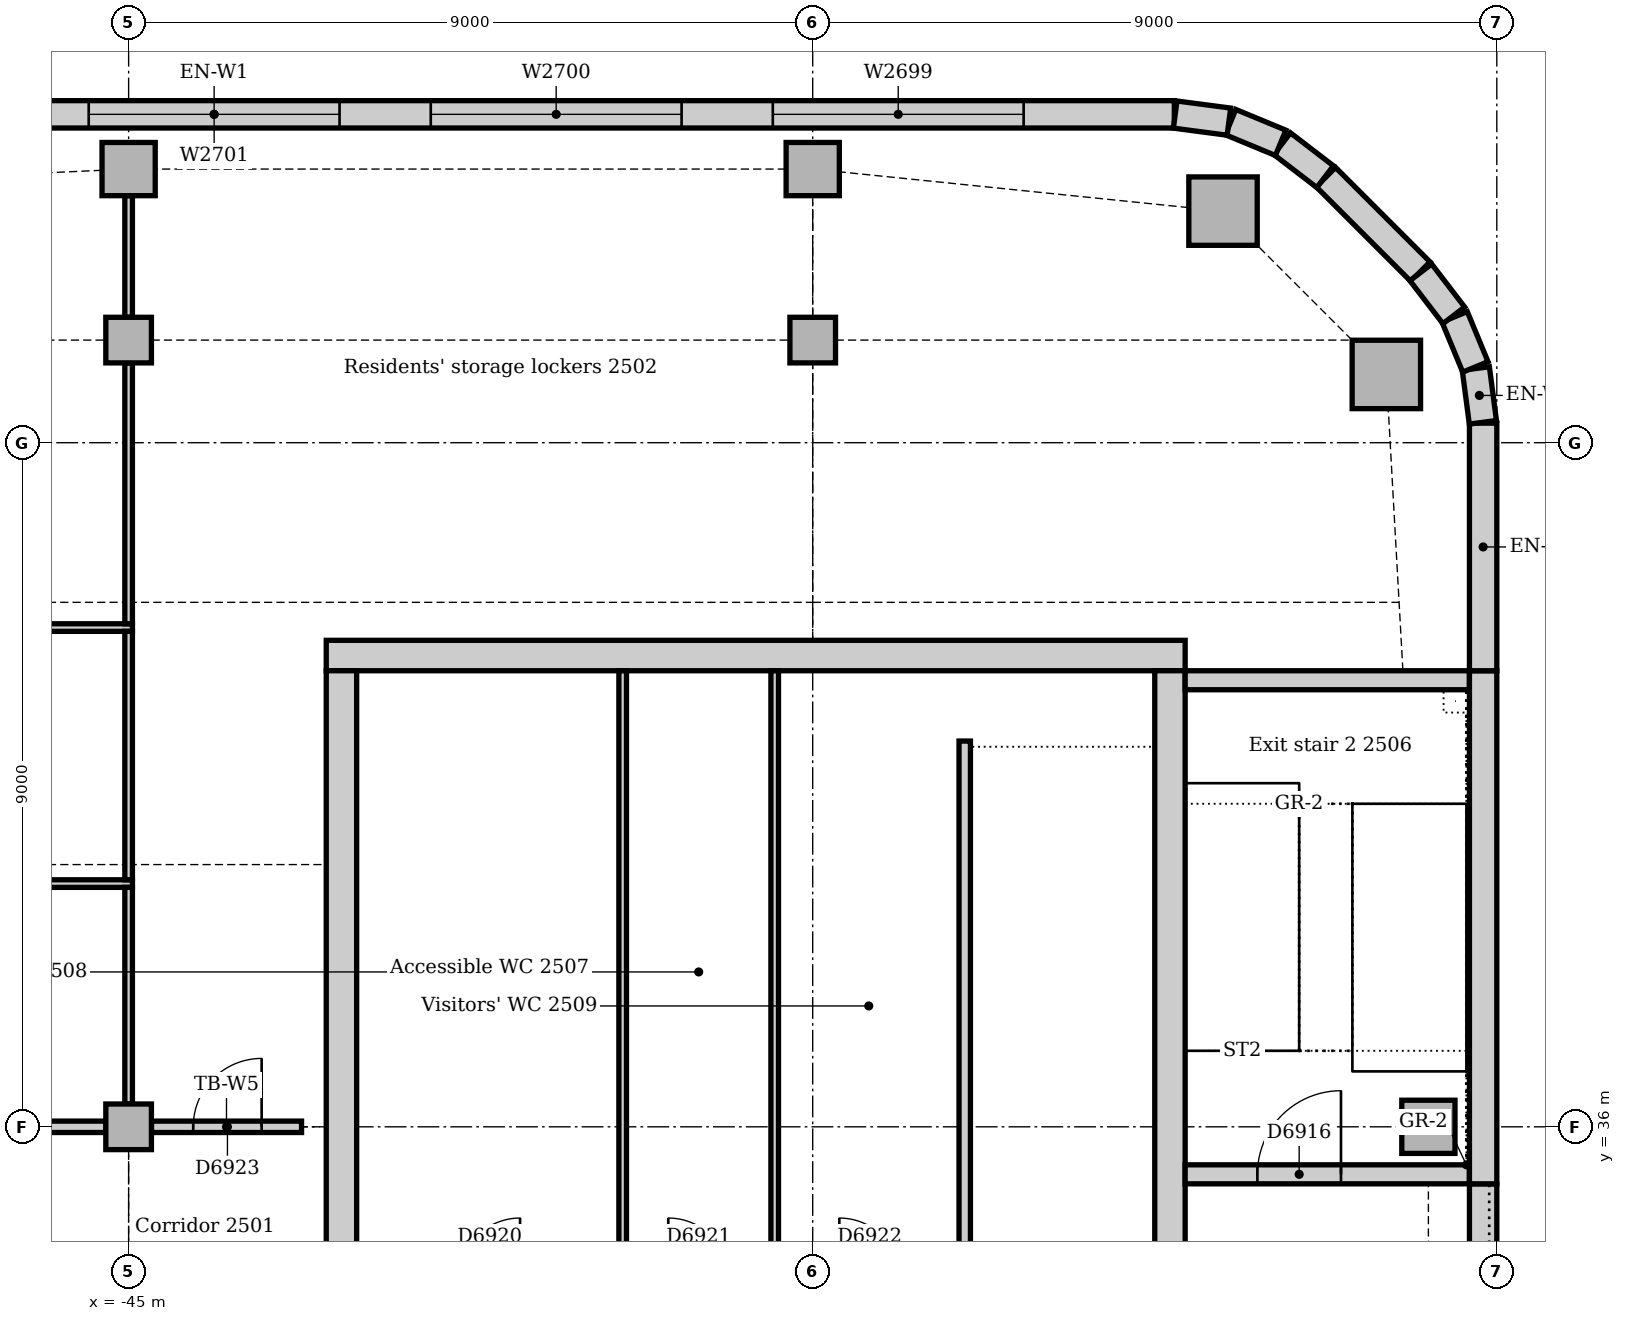
"""IFC4 building model, lengths in metres.
Left out: names, types, materials, properties, quantities, classifications, styles, units other than length and angle.
Written with IfcOpenShell. Run it as: python <this file> out.ifc"""

import sys

from ifc_helpers import new_model, si_unit, direction, frame, frame_2d, origin, origin_2d, place, context, subcontext, project, spatial, rectangle, extrude, element, fill, save


model = new_model("IFC4")
c1 = context("Model", 3, precision=1e-05, world=origin(), true_north=direction((0.0, 1.0)))
c2 = subcontext(c1, "Body", "Model", "MODEL_VIEW")
j1 = project(units=[si_unit("LENGTHUNIT", "METRE"), si_unit("PLANEANGLEUNIT", "RADIAN")], contexts=[c1])
p1 = place(None, origin())
s1 = spatial("IfcSite", under=j1, at=p1, CompositionType="ELEMENT")
p2 = place(p1, origin())
s2 = spatial("IfcBuilding", under=s1, at=p2, CompositionType="ELEMENT")
p3 = place(p2, frame((0.0, 0.0, 108.0)))
s3 = spatial("IfcBuildingStorey", under=s2, at=p3, CompositionType="ELEMENT", Elevation=108.0)
p4 = place(p3, frame((-31.1, 42.2, 0.0), z_axis=(0.0, 0.0, 1.0), x_axis=(-1.0, 0.0, 0.0)))
e1 = element("IfcWall", 1, at=p4, inside=s3, PredefinedType="SOLIDWALL", context=c2, shape_type="SweptSolid", body=[
    extrude(rectangle(XDim=11.3, YDim=0.4, at=frame_2d((5.65, 0.0))), origin(), (0.0, 0.0, 1.0), 4.0),
])
p5 = place(p3, frame((-31.3, 30.5, 0.0), z_axis=(0.0, 0.0, 1.0), x_axis=(0.0, 1.0, 0.0)))
e2 = element("IfcWall", 2, at=p5, inside=s3, PredefinedType="SOLIDWALL", context=c2, shape_type="SweptSolid", body=[
    extrude(rectangle(XDim=11.5, YDim=0.4, at=frame_2d((5.75, 0.0))), origin(), (0.0, 0.0, 1.0), 4.0),
])
p6 = place(p5, frame((0.85, 0.0, 0.0)))
e3 = element("IfcOpeningElement", 3, at=p6, cuts=e2, PredefinedType="OPENING", context=c2, shape_type="SweptSolid", body=[
    extrude(rectangle(XDim=1.8, YDim=2.1, at=frame_2d((0.9, 1.05))), frame((0.0, 0.21, 0.0), z_axis=(0.0, -1.0, 0.0), x_axis=(1.0, 0.0, 0.0)), (0.0, 0.0, 1.0), 0.42),
])
p7 = place(p3, frame((-42.2, 42.0, 0.0), z_axis=(0.0, 0.0, 1.0), x_axis=(0.0, -1.0, 0.0)))
e4 = element("IfcWall", 4, at=p7, inside=s3, PredefinedType="SOLIDWALL", context=c2, shape_type="SweptSolid", body=[
    extrude(rectangle(XDim=11.5, YDim=0.4, at=frame_2d((5.75, 0.0))), origin(), (0.0, 0.0, 1.0), 4.0),
])
p8 = place(p7, frame((8.85, 0.0, 0.0)))
e5 = element("IfcOpeningElement", 5, at=p8, cuts=e4, PredefinedType="OPENING", context=c2, shape_type="SweptSolid", body=[
    extrude(rectangle(XDim=1.8, YDim=2.1, at=frame_2d((0.9, 1.05))), frame((0.0, 0.21, 0.0), z_axis=(0.0, -1.0, 0.0), x_axis=(1.0, 0.0, 0.0)), (0.0, 0.0, 1.0), 0.42),
])
p9 = place(p3, frame((-31.1, 35.375, 0.0), z_axis=(0.0, 0.0, 1.0), x_axis=(1.0, 0.0, 0.0)))
e6 = element("IfcWall", 6, at=p9, inside=s3, PredefinedType="SOLIDWALL", context=c2, shape_type="SweptSolid", body=[
    extrude(rectangle(XDim=3.74, YDim=0.25, at=frame_2d((1.87, 0.0))), origin(), (0.0, 0.0, 1.0), 4.0),
])
p10 = place(p9, frame((0.95, 0.0, 0.0)))
e7 = element("IfcOpeningElement", 7, at=p10, cuts=e6, PredefinedType="OPENING", context=c2, shape_type="SweptSolid", body=[
    extrude(rectangle(XDim=1.1, YDim=2.1, at=frame_2d((0.55, 1.05))), frame((0.0, 0.135, 0.0), z_axis=(0.0, -1.0, 0.0), x_axis=(1.0, 0.0, 0.0)), (0.0, 0.0, 1.0), 0.27),
])
p11 = place(p3, frame((-27.36, 41.875, 0.0), z_axis=(0.0, 0.0, 1.0), x_axis=(-1.0, 0.0, 0.0)))
e8 = element("IfcWall", 8, at=p11, inside=s3, PredefinedType="SOLIDWALL", context=c2, shape_type="SweptSolid", body=[
    extrude(rectangle(XDim=3.74, YDim=0.25, at=frame_2d((1.87, 0.0))), origin(), (0.0, 0.0, 1.0), 4.0),
])
for number, where, z_axis, x_axis in (
    (9, (-28.453, 45.898, 0.0), (0.0, 0.0, 1.0), (1.0, 0.0, 0.0)),
    (10, (-30.602, 48.047, 0.0), (0.0, 0.0, 1.0), (1.0, 0.0, 0.0)),
):
    element("IfcColumn", number, at=place(p3, frame(where, z_axis=z_axis, x_axis=x_axis)), inside=s3, PredefinedType="COLUMN", context=c2, shape_type="SweptSolid", body=[
        extrude(rectangle(XDim=0.9, YDim=0.9, at=origin_2d()), origin(), (0.0, 0.0, 1.0), 3.85),
    ])
p12 = place(p3, frame((-27.9, 36.0, 0.0), z_axis=(0.0, 0.0, 1.0), x_axis=(1.0, 0.0, 0.0)))
e11 = element("IfcColumn", 11, at=p12, inside=s3, PredefinedType="COLUMN", context=c2, shape_type="SweptSolid", body=[
    extrude(rectangle(XDim=0.7, YDim=0.7, at=origin_2d()), origin(), (0.0, 0.0, 1.0), 4.0),
])
for number, where, z_axis, x_axis in (
    (12, (-45.0, 48.6, 0.0), (0.0, 0.0, 1.0), (1.0, 0.0, 0.0)),
    (13, (-36.0, 48.6, 0.0), (0.0, 0.0, 1.0), (1.0, 0.0, 0.0)),
):
    element("IfcColumn", number, at=place(p3, frame(where, z_axis=z_axis, x_axis=x_axis)), inside=s3, PredefinedType="COLUMN", context=c2, shape_type="SweptSolid", body=[
        extrude(rectangle(XDim=0.7, YDim=0.7, at=origin_2d()), origin(), (0.0, 0.0, 1.0), 3.85),
    ])
for number, where, z_axis, x_axis in (
    (14, (-45.0, 36.0, 0.0), (0.0, 0.0, 1.0), (1.0, 0.0, 0.0)),
    (15, (-45.0, 46.35, 0.0), (0.0, 0.0, 1.0), (1.0, 0.0, 0.0)),
    (16, (-36.0, 46.35, 0.0), (0.0, 0.0, 1.0), (1.0, 0.0, 0.0)),
):
    element("IfcColumn", number, at=place(p3, frame(where, z_axis=z_axis, x_axis=x_axis)), inside=s3, PredefinedType="COLUMN", context=c2, shape_type="SweptSolid", body=[
        extrude(rectangle(XDim=0.6, YDim=0.6, at=origin_2d()), origin(), (0.0, 0.0, 1.0), 3.85),
    ])
p13 = place(p3, frame((-27.18, 27.75, 0.0), z_axis=(0.0, 0.0, 1.0), x_axis=(0.0, 1.0, 0.0)))
e17 = element("IfcWall", 17, at=p13, inside=s3, PredefinedType="STANDARD", context=c2, shape_type="SweptSolid", body=[
    extrude(rectangle(XDim=7.5, YDim=0.36, at=frame_2d((3.75, 0.0))), origin(), (0.0, 0.0, 1.0), 3.85),
])
p14 = place(p13, frame((2.85, 0.0, 1.2)))
e18 = element("IfcOpeningElement", 18, at=p14, cuts=e17, PredefinedType="OPENING", context=c2, shape_type="SweptSolid", body=[
    extrude(rectangle(XDim=1.8, YDim=1.2, at=frame_2d((0.9, 0.6))), frame((0.0, 0.19, 0.0), z_axis=(0.0, -1.0, 0.0), x_axis=(1.0, 0.0, 0.0)), (0.0, 0.0, 1.0), 0.38),
])
p15 = place(p3, frame((-27.18, 35.25, 0.0), z_axis=(0.0, 0.0, 1.0), x_axis=(0.0, 1.0, 0.0)))
e19 = element("IfcWall", 19, at=p15, inside=s3, PredefinedType="STANDARD", context=c2, shape_type="SweptSolid", body=[
    extrude(rectangle(XDim=6.75, YDim=0.36, at=frame_2d((3.375, 0.0))), origin(), (0.0, 0.0, 1.0), 3.85),
])
p16 = place(p3, frame((-27.18, 42.0, 0.0), z_axis=(0.0, 0.0, 1.0), x_axis=(0.0, 1.0, 0.0)))
e20 = element("IfcWall", 20, at=p16, inside=s3, PredefinedType="STANDARD", context=c2, shape_type="SweptSolid", body=[
    extrude(rectangle(XDim=3.257, YDim=0.36, at=frame_2d((1.629, 0.0))), origin(), (0.0, 0.0, 1.0), 3.85),
])
p17 = place(p3, frame((-28.006, 47.251, 0.0), z_axis=(0.0, 0.0, 1.0), x_axis=(-0.707106781187, 0.707106781187, 0.0)))
e21 = element("IfcWall", 21, at=p17, inside=s3, PredefinedType="STANDARD", context=c2, shape_type="SweptSolid", body=[
    extrude(rectangle(XDim=1.757, YDim=0.36, at=frame_2d((0.879, 0.0))), origin(), (0.0, 0.0, 1.0), 3.85),
])
p18 = place(p3, frame((-31.243, 49.32, 0.0), z_axis=(0.0, 0.0, 1.0), x_axis=(-1.0, 0.0, 0.0)))
e22 = element("IfcWall", 22, at=p18, inside=s3, PredefinedType="STANDARD", context=c2, shape_type="SweptSolid", body=[
    extrude(rectangle(XDim=25.265, YDim=0.36, at=frame_2d((12.632, 0.0))), origin(), (0.0, 0.0, 1.0), 3.85),
])
p19 = place(p18, frame((1.982, 0.0, 0.9)))
e23 = element("IfcOpeningElement", 23, at=p19, cuts=e22, PredefinedType="OPENING", context=c2, shape_type="SweptSolid", body=[
    extrude(rectangle(XDim=3.3, YDim=1.6, at=frame_2d((1.65, 0.8))), frame((0.0, 0.19, 0.0), z_axis=(0.0, -1.0, 0.0), x_axis=(1.0, 0.0, 0.0)), (0.0, 0.0, 1.0), 0.38),
])
p20 = place(p18, frame((6.482, 0.0, 0.9)))
e24 = element("IfcOpeningElement", 24, at=p20, cuts=e22, PredefinedType="OPENING", context=c2, shape_type="SweptSolid", body=[
    extrude(rectangle(XDim=3.3, YDim=1.6, at=frame_2d((1.65, 0.8))), frame((0.0, 0.19, 0.0), z_axis=(0.0, -1.0, 0.0), x_axis=(1.0, 0.0, 0.0)), (0.0, 0.0, 1.0), 0.38),
])
p21 = place(p18, frame((10.982, 0.0, 0.9)))
e25 = element("IfcOpeningElement", 25, at=p21, cuts=e22, PredefinedType="OPENING", context=c2, shape_type="SweptSolid", body=[
    extrude(rectangle(XDim=3.3, YDim=1.6, at=frame_2d((1.65, 0.8))), frame((0.0, 0.19, 0.0), z_axis=(0.0, -1.0, 0.0), x_axis=(1.0, 0.0, 0.0)), (0.0, 0.0, 1.0), 0.38),
])
p22 = place(p18, frame((15.482, 0.0, 0.9)))
e26 = element("IfcOpeningElement", 26, at=p22, cuts=e22, PredefinedType="OPENING", context=c2, shape_type="SweptSolid", body=[
    extrude(rectangle(XDim=3.3, YDim=1.6, at=frame_2d((1.65, 0.8))), frame((0.0, 0.19, 0.0), z_axis=(0.0, -1.0, 0.0), x_axis=(1.0, 0.0, 0.0)), (0.0, 0.0, 1.0), 0.38),
])
p23 = place(p18, frame((19.982, 0.0, 0.9)))
e27 = element("IfcOpeningElement", 27, at=p23, cuts=e22, PredefinedType="OPENING", context=c2, shape_type="SweptSolid", body=[
    extrude(rectangle(XDim=3.3, YDim=1.6, at=frame_2d((1.65, 0.8))), frame((0.0, 0.19, 0.0), z_axis=(0.0, -1.0, 0.0), x_axis=(1.0, 0.0, 0.0)), (0.0, 0.0, 1.0), 0.38),
])
for number, where, z_axis, x_axis in (
    (28, (-27.183, 45.269, 0.0), (0.0, 0.0, 1.0), (-0.131, 0.991, 0.0)),
    (29, (-27.282, 45.997, 0.0), (0.0, 0.0, 1.0), (-0.383, 0.924, 0.0)),
):
    element("IfcWall", number, at=place(p3, frame(where, z_axis=z_axis, x_axis=x_axis)), inside=s3, PredefinedType="STANDARD", context=c2, shape_type="SweptSolid", body=[
        extrude(rectangle(XDim=0.713, YDim=0.36, at=frame_2d((0.356, 0.0))), origin(), (0.0, 0.0, 1.0), 3.85),
    ])
for number, where, z_axis, x_axis in (
    (30, (-27.566, 46.675, 0.0), (0.0, 0.0, 1.0), (-0.609, 0.793, 0.0)),
    (31, (-29.259, 48.5, 0.0), (0.0, 0.0, 1.0), (-0.793, 0.609, 0.0)),
):
    element("IfcWall", number, at=place(p3, frame(where, z_axis=z_axis, x_axis=x_axis)), inside=s3, PredefinedType="STANDARD", context=c2, shape_type="SweptSolid", body=[
        extrude(rectangle(XDim=0.713, YDim=0.36, at=frame_2d((0.357, 0.0))), origin(), (0.0, 0.0, 1.0), 3.85),
    ])
for number, where, z_axis, x_axis in (
    (32, (-29.844, 48.945, 0.0), (0.0, 0.0, 1.0), (-0.924, 0.383, 0.0)),
    (33, (-30.524, 49.224, 0.0), (0.0, 0.0, 1.0), (-0.991, 0.131, 0.0)),
):
    element("IfcWall", number, at=place(p3, frame(where, z_axis=z_axis, x_axis=x_axis)), inside=s3, PredefinedType="STANDARD", context=c2, shape_type="SweptSolid", body=[
        extrude(rectangle(XDim=0.713, YDim=0.36, at=frame_2d((0.356, 0.0))), origin(), (0.0, 0.0, 1.0), 3.85),
    ])
p24 = place(p3, frame((-34.0, 41.075, 0.0), z_axis=(0.0, 0.0, 1.0), x_axis=(0.0, -1.0, 0.0)))
e34 = element("IfcWall", 34, at=p24, inside=s3, PredefinedType="SOLIDWALL", context=c2, shape_type="SweptSolid", body=[
    extrude(rectangle(XDim=7.0, YDim=0.15, at=frame_2d((3.5, 0.0))), origin(), (0.0, 0.0, 1.0), 4.0),
])
for number, where, z_axis, x_axis in (
    (35, (-38.5, 34.075, 0.0), (0.0, 0.0, 1.0), (0.0, 1.0, 0.0)),
    (36, (-36.5, 34.075, 0.0), (0.0, 0.0, 1.0), (0.0, 1.0, 0.0)),
):
    element("IfcWall", number, at=place(p3, frame(where, z_axis=z_axis, x_axis=x_axis)), inside=s3, PredefinedType="PARTITIONING", context=c2, shape_type="SweptSolid", body=[
        extrude(rectangle(XDim=7.925, YDim=0.1, at=frame_2d((3.962, 0.0))), origin(), (0.0, 0.0, 1.0), 3.85),
    ])
p25 = place(p3, frame((-44.7, 36.0, 0.0), z_axis=(0.0, 0.0, 1.0), x_axis=(1.0, 0.0, 0.0)))
e37 = element("IfcWall", 37, at=p25, inside=s3, PredefinedType="PARTITIONING", context=c2, shape_type="SweptSolid", body=[
    extrude(rectangle(XDim=1.975, YDim=0.15, at=frame_2d((0.988, 0.0))), origin(), (0.0, 0.0, 1.0), 3.602),
])
p26 = place(p25, frame((0.55, 0.0, 0.0)))
e38 = element("IfcOpeningElement", 38, at=p26, cuts=e37, PredefinedType="OPENING", context=c2, shape_type="SweptSolid", body=[
    extrude(rectangle(XDim=0.9, YDim=2.1, at=frame_2d((0.45, 1.05))), frame((0.0, 0.085, 0.0), z_axis=(0.0, -1.0, 0.0), x_axis=(1.0, 0.0, 0.0)), (0.0, 0.0, 1.0), 0.17),
])
p27 = place(p3, frame((-53.7, 36.0, 0.0), z_axis=(0.0, 0.0, 1.0), x_axis=(1.0, 0.0, 0.0)))
e39 = element("IfcWall", 39, at=p27, inside=s3, PredefinedType="PARTITIONING", context=c2, shape_type="SweptSolid", body=[
    extrude(rectangle(XDim=8.4, YDim=0.15, at=frame_2d((4.2, 0.0))), origin(), (0.0, 0.0, 1.0), 3.262),
])
p28 = place(p27, frame((0.3, 0.0, 0.0)))
e40 = element("IfcOpeningElement", 40, at=p28, cuts=e39, PredefinedType="OPENING", context=c2, shape_type="SweptSolid", body=[
    extrude(rectangle(XDim=1.0, YDim=2.1, at=frame_2d((0.5, 1.05))), frame((0.0, 0.085, 0.0), z_axis=(0.0, -1.0, 0.0), x_axis=(1.0, 0.0, 0.0)), (0.0, 0.0, 1.0), 0.17),
])
p29 = place(p3, frame((-60.39, 39.2, 0.0), z_axis=(0.0, 0.0, 1.0), x_axis=(1.0, 0.0, 0.0)))
e41 = element("IfcWall", 41, at=p29, inside=s3, PredefinedType="PARTITIONING", context=c2, shape_type="SweptSolid", body=[
    extrude(rectangle(XDim=15.44, YDim=0.1, at=frame_2d((7.72, 0.0))), origin(), (0.0, 0.0, 1.0), 3.85),
])
p30 = place(p29, frame((6.021, 0.0, 0.0)))
e42 = element("IfcOpeningElement", 42, at=p30, cuts=e41, PredefinedType="OPENING", context=c2, shape_type="SweptSolid", body=[
    extrude(rectangle(XDim=0.9, YDim=2.1, at=frame_2d((0.45, 1.05))), frame((0.0, 0.06, 0.0), z_axis=(0.0, -1.0, 0.0), x_axis=(1.0, 0.0, 0.0)), (0.0, 0.0, 1.0), 0.12),
])
p31 = place(p3, frame((-60.39, 42.568, 0.0), z_axis=(0.0, 0.0, 1.0), x_axis=(1.0, 0.0, 0.0)))
e43 = element("IfcWall", 43, at=p31, inside=s3, PredefinedType="PARTITIONING", context=c2, shape_type="SweptSolid", body=[
    extrude(rectangle(XDim=15.44, YDim=0.1, at=frame_2d((7.72, 0.0))), origin(), (0.0, 0.0, 1.0), 3.85),
])
p32 = place(p31, frame((4.5, 0.0, 0.0)))
e44 = element("IfcOpeningElement", 44, at=p32, cuts=e43, PredefinedType="OPENING", context=c2, shape_type="SweptSolid", body=[
    extrude(rectangle(XDim=0.9, YDim=2.1, at=frame_2d((0.45, 1.05))), frame((0.0, 0.06, 0.0), z_axis=(0.0, -1.0, 0.0), x_axis=(1.0, 0.0, 0.0)), (0.0, 0.0, 1.0), 0.12),
])
p33 = place(p31, frame((12.06, 0.0, 0.0)))
e45 = element("IfcOpeningElement", 45, at=p33, cuts=e43, PredefinedType="OPENING", context=c2, shape_type="SweptSolid", body=[
    extrude(rectangle(XDim=0.9, YDim=2.1, at=frame_2d((0.45, 1.05))), frame((0.0, 0.06, 0.0), z_axis=(0.0, -1.0, 0.0), x_axis=(1.0, 0.0, 0.0)), (0.0, 0.0, 1.0), 0.12),
])
p34 = place(p3, frame((-45.0, 42.618, 0.0), z_axis=(0.0, 0.0, 1.0), x_axis=(0.0, 1.0, 0.0)))
e46 = element("IfcWall", 46, at=p34, inside=s3, PredefinedType="PARTITIONING", context=c2, shape_type="SweptSolid", body=[
    extrude(rectangle(XDim=3.432, YDim=0.1, at=frame_2d((1.716, 0.0))), origin(), (0.0, 0.0, 1.0), 3.362),
])
p35 = place(p3, frame((-45.0, 39.25, 0.0), z_axis=(0.0, 0.0, 1.0), x_axis=(0.0, 1.0, 0.0)))
e47 = element("IfcWall", 47, at=p35, inside=s3, PredefinedType="PARTITIONING", context=c2, shape_type="SweptSolid", body=[
    extrude(rectangle(XDim=3.268, YDim=0.1, at=frame_2d((1.634, 0.0))), origin(), (0.0, 0.0, 1.0), 3.362),
])
p36 = place(p3, frame((-45.0, 36.3, 0.0), z_axis=(0.0, 0.0, 1.0), x_axis=(0.0, 1.0, 0.0)))
e48 = element("IfcWall", 48, at=p36, inside=s3, PredefinedType="PARTITIONING", context=c2, shape_type="SweptSolid", body=[
    extrude(rectangle(XDim=2.85, YDim=0.1, at=frame_2d((1.425, 0.0))), origin(), (0.0, 0.0, 1.0), 3.362),
])
p37 = place(p3, frame((-45.0, 46.65, 0.0), z_axis=(0.0, 0.0, 1.0), x_axis=(0.0, 1.0, 0.0)))
e49 = element("IfcWall", 49, at=p37, inside=s3, PredefinedType="PARTITIONING", context=c2, shape_type="SweptSolid", body=[
    extrude(rectangle(XDim=1.6, YDim=0.1, at=frame_2d((0.8, 0.0))), origin(), (0.0, 0.0, 1.0), 3.652),
])
p38 = place(p19, origin())
e50 = element("IfcWindow", 50, at=p38, inside=s3, PartitioningType="SINGLE_PANEL", PredefinedType="WINDOW", context=c2, shape_type="SweptSolid", body=[
    extrude(rectangle(XDim=3.3, YDim=1.6, at=frame_2d((1.65, 0.8))), frame((0.0, 0.13, 0.0), z_axis=(0.0, -1.0, 0.0), x_axis=(1.0, 0.0, 0.0)), (0.0, 0.0, 1.0), 0.06),
])
fill(e23, e50)
p39 = place(p20, origin())
e51 = element("IfcWindow", 51, at=p39, inside=s3, PartitioningType="SINGLE_PANEL", PredefinedType="WINDOW", context=c2, shape_type="SweptSolid", body=[
    extrude(rectangle(XDim=3.3, YDim=1.6, at=frame_2d((1.65, 0.8))), frame((0.0, 0.13, 0.0), z_axis=(0.0, -1.0, 0.0), x_axis=(1.0, 0.0, 0.0)), (0.0, 0.0, 1.0), 0.06),
])
fill(e24, e51)
p40 = place(p21, origin())
e52 = element("IfcWindow", 52, at=p40, inside=s3, PartitioningType="SINGLE_PANEL", PredefinedType="WINDOW", context=c2, shape_type="SweptSolid", body=[
    extrude(rectangle(XDim=3.3, YDim=1.6, at=frame_2d((1.65, 0.8))), frame((0.0, 0.13, 0.0), z_axis=(0.0, -1.0, 0.0), x_axis=(1.0, 0.0, 0.0)), (0.0, 0.0, 1.0), 0.06),
])
fill(e25, e52)
p41 = place(p10, origin())
e53 = element("IfcDoor", 53, at=p41, inside=s3, OperationType="SINGLE_SWING_RIGHT", PredefinedType="DOOR", context=c2, shape_type="SweptSolid", body=[
    extrude(rectangle(XDim=1.1, YDim=2.1, at=frame_2d((0.55, 1.05))), frame((0.0, 0.025, 0.0), z_axis=(0.0, -1.0, 0.0), x_axis=(1.0, 0.0, 0.0)), (0.0, 0.0, 1.0), 0.05),
])
fill(e7, e53)
p42 = place(p26, origin())
e54 = element("IfcDoor", 54, at=p42, inside=s3, OperationType="SINGLE_SWING_RIGHT", PredefinedType="DOOR", context=c2, shape_type="SweptSolid", body=[
    extrude(rectangle(XDim=0.9, YDim=2.1, at=frame_2d((0.45, 1.05))), frame((0.0, 0.025, 0.0), z_axis=(0.0, -1.0, 0.0), x_axis=(1.0, 0.0, 0.0)), (0.0, 0.0, 1.0), 0.05),
])
fill(e38, e54)
save(model, sys.argv[1])
